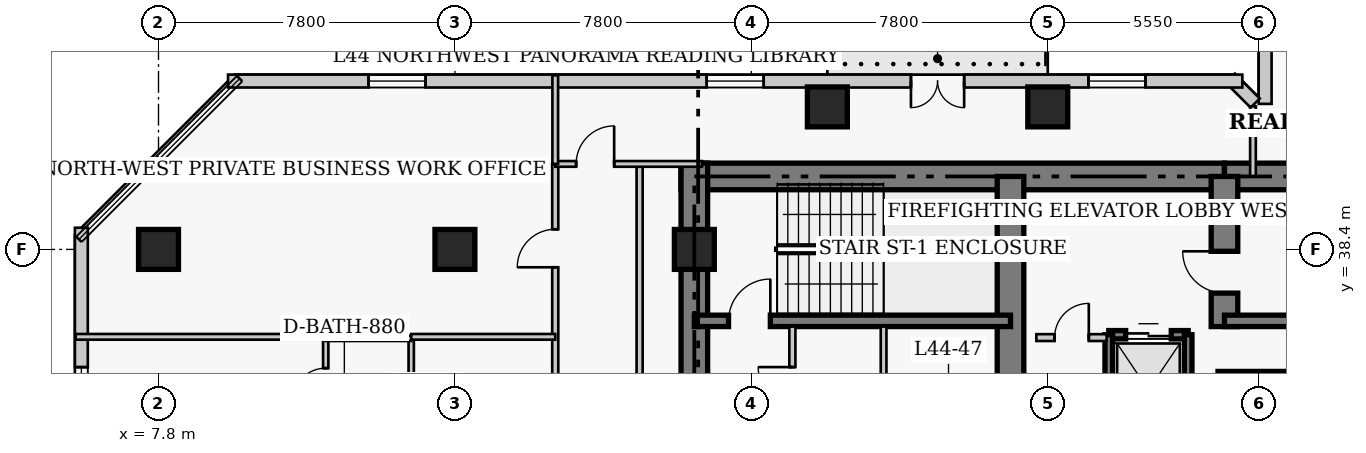
"""IFC4 building model, lengths in metres.
Left out: names, types, materials, properties, quantities, classifications, styles, units other than length and angle.
Written with IfcOpenShell. Run it as: python <this file> out.ifc"""

import sys

from ifc_helpers import new_model, si_unit, direction, frame, frame_2d, origin, origin_2d, place, context, subcontext, project, spatial, rectangle, extrude, element, fill, save


model = new_model("IFC4")
c1 = context("Model", 3, precision=1e-05, world=origin(), true_north=direction((0.0, 1.0)))
c2 = subcontext(c1, "Body", "Model", "MODEL_VIEW")
j1 = project(units=[si_unit("LENGTHUNIT", "METRE"), si_unit("PLANEANGLEUNIT", "RADIAN")], contexts=[c1])
p1 = place(None, origin())
s1 = spatial("IfcSite", under=j1, at=p1, CompositionType="ELEMENT")
p2 = place(p1, origin())
s2 = spatial("IfcBuilding", under=s1, at=p2, CompositionType="ELEMENT")
p3 = place(p2, frame((0.0, 0.0, 176.4)))
s3 = spatial("IfcBuildingStorey", under=s2, at=p3, CompositionType="ELEMENT", Elevation=176.4)
p4 = place(p3, frame((21.55, 40.32, 0.0), z_axis=(0.0, 0.0, 1.0), x_axis=(1.0, 0.0, 0.0)))
e1 = element("IfcWall", 1, at=p4, inside=s3, PredefinedType="SHEAR", context=c2, shape_type="SweptSolid", body=[
    extrude(rectangle(XDim=14.3, YDim=0.7, at=frame_2d((7.15, 0.0))), origin(), (0.0, 0.0, 1.0), 3.8),
])
p5 = place(p3, frame((35.85, 40.32, 0.0), z_axis=(0.0, 0.0, 1.0), x_axis=(1.0, 0.0, 0.0)))
e2 = element("IfcWall", 2, at=p5, inside=s3, PredefinedType="SHEAR", context=c2, shape_type="SweptSolid", body=[
    extrude(rectangle(XDim=12.6, YDim=0.7, at=frame_2d((6.3, 0.0))), origin(), (0.0, 0.0, 1.0), 3.8),
])
p6 = place(p3, frame((21.9, 27.05, 0.0), z_axis=(0.0, 0.0, 1.0), x_axis=(0.0, 1.0, 0.0)))
e3 = element("IfcWall", 3, at=p6, inside=s3, PredefinedType="SHEAR", context=c2, shape_type="SweptSolid", body=[
    extrude(rectangle(XDim=13.62, YDim=0.7, at=frame_2d((6.81, 0.0))), origin(), (0.0, 0.0, 1.0), 3.8),
])
p7 = place(p3, frame((30.22, 33.1, 0.0), z_axis=(0.0, 0.0, 1.0), x_axis=(0.0, 1.0, 0.0)))
e4 = element("IfcWall", 4, at=p7, inside=s3, PredefinedType="SHEAR", context=c2, shape_type="SweptSolid", body=[
    extrude(rectangle(XDim=7.22, YDim=0.7, at=frame_2d((3.61, 0.0))), origin(), (0.0, 0.0, 1.0), 3.8),
])
p8 = place(p3, frame((35.85, 36.37, 0.0), z_axis=(0.0, 0.0, 1.0), x_axis=(0.0, 1.0, 0.0)))
e5 = element("IfcWall", 5, at=p8, inside=s3, PredefinedType="SHEAR", context=c2, shape_type="SweptSolid", body=[
    extrude(rectangle(XDim=3.95, YDim=0.7, at=frame_2d((1.975, 0.0))), origin(), (0.0, 0.0, 1.0), 3.8),
])
p9 = place(p8, frame((0.88, 0.0, 0.0)))
e6 = element("IfcOpeningElement", 6, at=p9, cuts=e5, PredefinedType="OPENING", context=c2, shape_type="SweptSolid", body=[
    extrude(rectangle(XDim=1.1, YDim=2.15, at=frame_2d((0.55, 1.075))), frame((0.0, 0.36, 0.0), z_axis=(0.0, -1.0, 0.0), x_axis=(1.0, 0.0, 0.0)), (0.0, 0.0, 1.0), 0.72),
])
p10 = place(p3, frame((21.9, 36.52, 0.0), z_axis=(0.0, 0.0, 1.0), x_axis=(1.0, 0.0, 0.0)))
e7 = element("IfcWall", 7, at=p10, inside=s3, PredefinedType="SHEAR", context=c2, shape_type="SweptSolid", body=[
    extrude(rectangle(XDim=8.32, YDim=0.3, at=frame_2d((4.16, 0.0))), origin(), (0.0, 0.0, 1.0), 3.8),
])
p11 = place(p10, frame((0.9, 0.0, 0.0)))
e8 = element("IfcOpeningElement", 8, at=p11, cuts=e7, PredefinedType="OPENING", context=c2, shape_type="SweptSolid", body=[
    extrude(rectangle(XDim=1.1, YDim=2.15, at=frame_2d((0.55, 1.075))), frame((0.0, 0.16, 0.0), z_axis=(0.0, -1.0, 0.0), x_axis=(1.0, 0.0, 0.0)), (0.0, 0.0, 1.0), 0.32),
])
p12 = place(p3, frame((35.85, 36.52, 0.0), z_axis=(0.0, 0.0, 1.0), x_axis=(1.0, 0.0, 0.0)))
e9 = element("IfcWall", 9, at=p12, inside=s3, PredefinedType="SHEAR", context=c2, shape_type="SweptSolid", body=[
    extrude(rectangle(XDim=8.33, YDim=0.3, at=frame_2d((4.165, 0.0))), origin(), (0.0, 0.0, 1.0), 3.8),
])
for number, where, z_axis, x_axis in (
    (10, (7.8, 38.4, 0.0), (0.0, 0.0, 1.0), (1.0, 0.0, 0.0)),
    (11, (15.6, 38.4, 0.0), (0.0, 0.0, 1.0), (1.0, 0.0, 0.0)),
    (12, (21.9, 38.4, 0.0), (0.0, 0.0, 1.0), (1.0, 0.0, 0.0)),
    (13, (25.4, 42.15, 0.0), (0.0, 0.0, 1.0), (1.0, 0.0, 0.0)),
    (14, (31.2, 42.15, 0.0), (0.0, 0.0, 1.0), (1.0, 0.0, 0.0)),
):
    element("IfcColumn", number, at=place(p3, frame(where, z_axis=z_axis, x_axis=x_axis)), inside=s3, PredefinedType="COLUMN", context=c2, shape_type="SweptSolid", body=[
        extrude(rectangle(XDim=1.05, YDim=1.05, at=origin_2d()), origin(), (0.0, 0.0, 1.0), 3.8),
    ])
p13 = place(p3, frame((36.92, 44.37, 0.0), z_axis=(0.0, 0.0, 1.0), x_axis=(0.0, -1.0, 0.0)))
e15 = element("IfcWall", 15, at=p13, inside=s3, PredefinedType="SOLIDWALL", context=c2, shape_type="SweptSolid", body=[
    extrude(rectangle(XDim=2.14, YDim=0.34, at=frame_2d((1.07, 0.0))), origin(), (0.0, 0.0, 1.0), 3.55),
])
p14 = place(p3, frame((36.658, 42.251, 0.0), z_axis=(0.0, 0.0, 1.0), x_axis=(-0.707106781187, 0.707106781187, 0.0)))
e16 = element("IfcWall", 16, at=p14, inside=s3, PredefinedType="SOLIDWALL", context=c2, shape_type="SweptSolid", body=[
    extrude(rectangle(XDim=0.929, YDim=0.34, at=frame_2d((0.464, 0.0))), origin(), (0.0, 0.0, 1.0), 3.55),
])
p15 = place(p3, frame((36.32, 42.83, 0.0), z_axis=(0.0, 0.0, 1.0), x_axis=(-1.0, 0.0, 0.0)))
e17 = element("IfcWall", 17, at=p15, inside=s3, PredefinedType="SOLIDWALL", context=c2, shape_type="SweptSolid", body=[
    extrude(rectangle(XDim=26.69, YDim=0.34, at=frame_2d((13.345, 0.0))), origin(), (0.0, 0.0, 1.0), 3.55),
])
p16 = place(p15, frame((7.32, 0.0, 0.0)))
e18 = element("IfcOpeningElement", 18, at=p16, cuts=e17, PredefinedType="OPENING", context=c2, shape_type="SweptSolid", body=[
    extrude(rectangle(XDim=1.4, YDim=2.15, at=frame_2d((0.7, 1.075))), frame((0.0, 0.18, 0.0), z_axis=(0.0, -1.0, 0.0), x_axis=(1.0, 0.0, 0.0)), (0.0, 0.0, 1.0), 0.36),
])
p17 = place(p15, frame((2.548, 0.0, 0.85)))
e19 = element("IfcOpeningElement", 19, at=p17, cuts=e17, PredefinedType="OPENING", context=c2, shape_type="SweptSolid", body=[
    extrude(rectangle(XDim=1.5, YDim=1.75, at=frame_2d((0.75, 0.875))), frame((0.0, 0.18, 0.0), z_axis=(0.0, -1.0, 0.0), x_axis=(1.0, 0.0, 0.0)), (0.0, 0.0, 1.0), 0.36),
])
p18 = place(p15, frame((12.595, 0.0, 0.85)))
e20 = element("IfcOpeningElement", 20, at=p18, cuts=e17, PredefinedType="OPENING", context=c2, shape_type="SweptSolid", body=[
    extrude(rectangle(XDim=1.5, YDim=1.75, at=frame_2d((0.75, 0.875))), frame((0.0, 0.18, 0.0), z_axis=(0.0, -1.0, 0.0), x_axis=(1.0, 0.0, 0.0)), (0.0, 0.0, 1.0), 0.36),
])
p19 = place(p15, frame((21.492, 0.0, 0.85)))
e21 = element("IfcOpeningElement", 21, at=p19, cuts=e17, PredefinedType="OPENING", context=c2, shape_type="SweptSolid", body=[
    extrude(rectangle(XDim=1.5, YDim=1.75, at=frame_2d((0.75, 0.875))), frame((0.0, 0.18, 0.0), z_axis=(0.0, -1.0, 0.0), x_axis=(1.0, 0.0, 0.0)), (0.0, 0.0, 1.0), 0.36),
])
p20 = place(p3, frame((5.77, 38.97, 0.0), z_axis=(0.0, 0.0, 1.0), x_axis=(0.0, -1.0, 0.0)))
e22 = element("IfcWall", 22, at=p20, inside=s3, PredefinedType="SOLIDWALL", context=c2, shape_type="SweptSolid", body=[
    extrude(rectangle(XDim=30.14, YDim=0.34, at=frame_2d((15.07, 0.0))), origin(), (0.0, 0.0, 1.0), 3.55),
])
p21 = place(p20, frame((3.667, 0.0, 0.85)))
e23 = element("IfcOpeningElement", 23, at=p21, cuts=e22, PredefinedType="OPENING", context=c2, shape_type="SweptSolid", body=[
    extrude(rectangle(XDim=1.5, YDim=1.75, at=frame_2d((0.75, 0.875))), frame((0.0, 0.18, 0.0), z_axis=(0.0, -1.0, 0.0), x_axis=(1.0, 0.0, 0.0)), (0.0, 0.0, 1.0), 0.36),
])
p22 = place(p20, frame((10.552, 0.0, 0.85)))
e24 = element("IfcOpeningElement", 24, at=p22, cuts=e22, PredefinedType="OPENING", context=c2, shape_type="SweptSolid", body=[
    extrude(rectangle(XDim=1.5, YDim=1.75, at=frame_2d((0.75, 0.875))), frame((0.0, 0.18, 0.0), z_axis=(0.0, -1.0, 0.0), x_axis=(1.0, 0.0, 0.0)), (0.0, 0.0, 1.0), 0.36),
])
p23 = place(p20, frame((16.938, 0.0, 0.85)))
e25 = element("IfcOpeningElement", 25, at=p23, cuts=e22, PredefinedType="OPENING", context=c2, shape_type="SweptSolid", body=[
    extrude(rectangle(XDim=1.5, YDim=1.75, at=frame_2d((0.75, 0.875))), frame((0.0, 0.18, 0.0), z_axis=(0.0, -1.0, 0.0), x_axis=(1.0, 0.0, 0.0)), (0.0, 0.0, 1.0), 0.36),
])
p24 = place(p20, frame((25.623, 0.0, 0.85)))
e26 = element("IfcOpeningElement", 26, at=p24, cuts=e22, PredefinedType="OPENING", context=c2, shape_type="SweptSolid", body=[
    extrude(rectangle(XDim=1.5, YDim=1.75, at=frame_2d((0.75, 0.875))), frame((0.0, 0.18, 0.0), z_axis=(0.0, -1.0, 0.0), x_axis=(1.0, 0.0, 0.0)), (0.0, 0.0, 1.0), 0.36),
])
p25 = place(p3, frame((35.68, 35.08, 0.0), z_axis=(0.0, 0.0, 1.0), x_axis=(1.0, 0.0, 0.0)))
e27 = element("IfcWall", 27, at=p25, inside=s3, PredefinedType="SHEAR", context=c2, shape_type="SweptSolid", body=[
    extrude(rectangle(XDim=2.32, YDim=0.22, at=frame_2d((1.16, 0.0))), origin(), (0.0, 0.0, 1.0), 3.8),
])
p26 = place(p3, frame((32.805, 36.155, 0.0), z_axis=(0.0, 0.0, 1.0), x_axis=(1.0, 0.0, 0.0)))
e28 = element("IfcWall", 28, at=p26, inside=s3, PredefinedType="SHEAR", context=c2, shape_type="SweptSolid", body=[
    extrude(rectangle(XDim=2.09, YDim=0.22, at=frame_2d((1.045, 0.0))), origin(), (0.0, 0.0, 1.0), 3.8),
])
p27 = place(p26, frame((0.445, 0.0, 0.0)))
e29 = element("IfcOpeningElement", 29, at=p27, cuts=e28, PredefinedType="OPENING", context=c2, shape_type="SweptSolid", body=[
    extrude(rectangle(XDim=1.2, YDim=2.15, at=frame_2d((0.6, 1.075))), frame((0.0, 0.12, 0.0), z_axis=(0.0, -1.0, 0.0), x_axis=(1.0, 0.0, 0.0)), (0.0, 0.0, 1.0), 0.24),
])
for number, where, z_axis, x_axis in (
    (30, (32.805, 33.245, 0.0), (0.0, 0.0, 1.0), (0.0, 1.0, 0.0)),
    (31, (34.895, 33.245, 0.0), (0.0, 0.0, 1.0), (0.0, 1.0, 0.0)),
):
    element("IfcWall", number, at=place(p3, frame(where, z_axis=z_axis, x_axis=x_axis)), inside=s3, PredefinedType="SHEAR", context=c2, shape_type="SweptSolid", body=[
        extrude(rectangle(XDim=2.91, YDim=0.2, at=frame_2d((1.455, 0.0))), origin(), (0.0, 0.0, 1.0), 3.8),
    ])
p28 = place(p3, frame((30.9, 36.08, 0.0), z_axis=(0.0, 0.0, 1.0), x_axis=(1.0, 0.0, 0.0)))
e32 = element("IfcWall", 32, at=p28, inside=s3, PredefinedType="PARTITIONING", context=c2, shape_type="SweptSolid", body=[
    extrude(rectangle(XDim=1.85, YDim=0.18, at=frame_2d((0.925, 0.0))), origin(), (0.0, 0.0, 1.0), 3.55),
])
p29 = place(p28, frame((0.48, 0.0, 0.0)))
e33 = element("IfcOpeningElement", 33, at=p29, cuts=e32, PredefinedType="OPENING", context=c2, shape_type="SweptSolid", body=[
    extrude(rectangle(XDim=0.9, YDim=2.15, at=frame_2d((0.45, 1.075))), frame((0.0, 0.1, 0.0), z_axis=(0.0, -1.0, 0.0), x_axis=(1.0, 0.0, 0.0)), (0.0, 0.0, 1.0), 0.2),
])
p30 = place(p3, frame((24.48, 32.8, 0.0), z_axis=(0.0, 0.0, 1.0), x_axis=(0.0, 1.0, 0.0)))
e34 = element("IfcWall", 34, at=p30, inside=s3, PredefinedType="PARTITIONING", context=c2, shape_type="SweptSolid", body=[
    extrude(rectangle(XDim=3.57, YDim=0.16, at=frame_2d((1.785, 0.0))), origin(), (0.0, 0.0, 1.0), 3.55),
])
p31 = place(p30, frame((1.604, 0.0, 0.0)))
e35 = element("IfcOpeningElement", 35, at=p31, cuts=e34, PredefinedType="OPENING", context=c2, shape_type="SweptSolid", body=[
    extrude(rectangle(XDim=0.9, YDim=2.1, at=frame_2d((0.45, 1.05))), frame((0.0, 0.09, 0.0), z_axis=(0.0, -1.0, 0.0), x_axis=(1.0, 0.0, 0.0)), (0.0, 0.0, 1.0), 0.18),
])
p32 = place(p3, frame((26.88, 32.75, 0.0), z_axis=(0.0, 0.0, 1.0), x_axis=(0.0, 1.0, 0.0)))
e36 = element("IfcWall", 36, at=p32, inside=s3, PredefinedType="PARTITIONING", context=c2, shape_type="SweptSolid", body=[
    extrude(rectangle(XDim=3.62, YDim=0.15, at=frame_2d((1.81, 0.0))), origin(), (0.0, 0.0, 1.0), 3.55),
])
p33 = place(p3, frame((18.24, 6.85, 0.0), z_axis=(0.0, 0.0, 1.0), x_axis=(0.0, 1.0, 0.0)))
e37 = element("IfcWall", 37, at=p33, inside=s3, PredefinedType="PARTITIONING", context=c2, shape_type="SweptSolid", body=[
    extrude(rectangle(XDim=33.8, YDim=0.16, at=frame_2d((16.9, 0.0))), origin(), (0.0, 0.0, 1.0), 3.55),
])
p34 = place(p33, frame((1.7, 0.0, 0.0)))
e38 = element("IfcOpeningElement", 38, at=p34, cuts=e37, PredefinedType="OPENING", context=c2, shape_type="SweptSolid", body=[
    extrude(rectangle(XDim=0.95, YDim=2.1, at=frame_2d((0.475, 1.05))), frame((0.0, 0.09, 0.0), z_axis=(0.0, -1.0, 0.0), x_axis=(1.0, 0.0, 0.0)), (0.0, 0.0, 1.0), 0.18),
])
p35 = place(p33, frame((8.275, 0.0, 0.0)))
e39 = element("IfcOpeningElement", 39, at=p35, cuts=e37, PredefinedType="OPENING", context=c2, shape_type="SweptSolid", body=[
    extrude(rectangle(XDim=0.95, YDim=2.1, at=frame_2d((0.475, 1.05))), frame((0.0, 0.09, 0.0), z_axis=(0.0, -1.0, 0.0), x_axis=(1.0, 0.0, 0.0)), (0.0, 0.0, 1.0), 0.18),
])
p36 = place(p33, frame((20.725, 0.0, 0.0)))
e40 = element("IfcOpeningElement", 40, at=p36, cuts=e37, PredefinedType="OPENING", context=c2, shape_type="SweptSolid", body=[
    extrude(rectangle(XDim=0.95, YDim=2.1, at=frame_2d((0.475, 1.05))), frame((0.0, 0.09, 0.0), z_axis=(0.0, -1.0, 0.0), x_axis=(1.0, 0.0, 0.0)), (0.0, 0.0, 1.0), 0.18),
])
p37 = place(p33, frame((31.08, 0.0, 0.0)))
e41 = element("IfcOpeningElement", 41, at=p37, cuts=e37, PredefinedType="OPENING", context=c2, shape_type="SweptSolid", body=[
    extrude(rectangle(XDim=1.0, YDim=2.15, at=frame_2d((0.5, 1.075))), frame((0.0, 0.09, 0.0), z_axis=(0.0, -1.0, 0.0), x_axis=(1.0, 0.0, 0.0)), (0.0, 0.0, 1.0), 0.18),
])
p38 = place(p3, frame((20.46, 35.02, 0.0), z_axis=(0.0, 0.0, 1.0), x_axis=(0.0, 1.0, 0.0)))
e42 = element("IfcWall", 42, at=p38, inside=s3, PredefinedType="PARTITIONING", context=c2, shape_type="SweptSolid", body=[
    extrude(rectangle(XDim=5.63, YDim=0.16, at=frame_2d((2.815, 0.0))), origin(), (0.0, 0.0, 1.0), 3.55),
])
p39 = place(p3, frame((18.24, 40.65, 0.0), z_axis=(0.0, 0.0, 1.0), x_axis=(1.0, 0.0, 0.0)))
e43 = element("IfcWall", 43, at=p39, inside=s3, PredefinedType="PARTITIONING", context=c2, shape_type="SweptSolid", body=[
    extrude(rectangle(XDim=3.86, YDim=0.15, at=frame_2d((1.93, 0.0))), origin(), (0.0, 0.0, 1.0), 3.55),
])
p40 = place(p39, frame((0.55, 0.0, 0.0)))
e44 = element("IfcOpeningElement", 44, at=p40, cuts=e43, PredefinedType="OPENING", context=c2, shape_type="SweptSolid", body=[
    extrude(rectangle(XDim=1.0, YDim=2.15, at=frame_2d((0.5, 1.075))), frame((0.0, 0.085, 0.0), z_axis=(0.0, -1.0, 0.0), x_axis=(1.0, 0.0, 0.0)), (0.0, 0.0, 1.0), 0.17),
])
p41 = place(p3, frame((18.24, 40.65, 0.0), z_axis=(0.0, 0.0, 1.0), x_axis=(0.0, 1.0, 0.0)))
e45 = element("IfcWall", 45, at=p41, inside=s3, PredefinedType="PARTITIONING", context=c2, shape_type="SweptSolid", body=[
    extrude(rectangle(XDim=2.33, YDim=0.15, at=frame_2d((1.165, 0.0))), origin(), (0.0, 0.0, 1.0), 3.55),
])
p42 = place(p3, frame((36.6, 40.32, 0.0), z_axis=(0.0, 0.0, 1.0), x_axis=(0.0, 1.0, 0.0)))
e46 = element("IfcWall", 46, at=p42, inside=s3, PredefinedType="PARTITIONING", context=c2, shape_type="SweptSolid", body=[
    extrude(rectangle(XDim=1.845, YDim=0.15, at=frame_2d((0.922, 0.0))), origin(), (0.0, 0.0, 1.0), 3.55),
])
p43 = place(p3, frame((12.2, 33.61, 0.0), z_axis=(0.0, 0.0, 1.0), x_axis=(0.0, 1.0, 0.0)))
e47 = element("IfcWall", 47, at=p43, inside=s3, PredefinedType="PLUMBINGWALL", context=c2, shape_type="SweptSolid", body=[
    extrude(rectangle(XDim=2.45, YDim=0.14, at=frame_2d((1.225, 0.0))), origin(), (0.0, 0.0, 1.0), 3.55),
])
p44 = place(p43, frame((0.785, 0.0, 0.0)))
e48 = element("IfcOpeningElement", 48, at=p44, cuts=e47, PredefinedType="OPENING", context=c2, shape_type="SweptSolid", body=[
    extrude(rectangle(XDim=0.88, YDim=2.05, at=frame_2d((0.44, 1.025))), frame((0.0, 0.08, 0.0), z_axis=(0.0, -1.0, 0.0), x_axis=(1.0, 0.0, 0.0)), (0.0, 0.0, 1.0), 0.16),
])
p45 = place(p3, frame((14.45, 33.61, 0.0), z_axis=(0.0, 0.0, 1.0), x_axis=(0.0, 1.0, 0.0)))
e49 = element("IfcWall", 49, at=p45, inside=s3, PredefinedType="PLUMBINGWALL", context=c2, shape_type="SweptSolid", body=[
    extrude(rectangle(XDim=2.45, YDim=0.14, at=frame_2d((1.225, 0.0))), origin(), (0.0, 0.0, 1.0), 3.55),
])
p46 = place(p3, frame((12.2, 36.06, 0.0), z_axis=(0.0, 0.0, 1.0), x_axis=(1.0, 0.0, 0.0)))
e50 = element("IfcWall", 50, at=p46, inside=s3, PredefinedType="PLUMBINGWALL", context=c2, shape_type="SweptSolid", body=[
    extrude(rectangle(XDim=2.25, YDim=0.14, at=frame_2d((1.125, 0.0))), origin(), (0.0, 0.0, 1.0), 3.55),
])
p47 = place(p3, frame((5.62, 36.1, 0.0), z_axis=(0.0, 0.0, 1.0), x_axis=(1.0, 0.0, 0.0)))
e51 = element("IfcWall", 51, at=p47, inside=s3, PredefinedType="PARTITIONING", context=c2, shape_type="SweptSolid", body=[
    extrude(rectangle(XDim=6.58, YDim=0.15, at=frame_2d((3.29, 0.0))), origin(), (0.0, 0.0, 1.0), 3.55),
])
p48 = place(p3, frame((14.45, 36.1, 0.0), z_axis=(0.0, 0.0, 1.0), x_axis=(1.0, 0.0, 0.0)))
e52 = element("IfcWall", 52, at=p48, inside=s3, PredefinedType="PARTITIONING", context=c2, shape_type="SweptSolid", body=[
    extrude(rectangle(XDim=3.79, YDim=0.15, at=frame_2d((1.895, 0.0))), origin(), (0.0, 0.0, 1.0), 3.55),
])
p49 = place(p16, origin())
e53 = element("IfcDoor", 53, at=p49, inside=s3, OperationType="DOUBLE_DOOR_SINGLE_SWING", PredefinedType="DOOR", context=c2, shape_type="SweptSolid", body=[
    extrude(rectangle(XDim=1.4, YDim=2.15, at=frame_2d((0.7, 1.075))), frame((0.0, 0.025, 0.0), z_axis=(0.0, -1.0, 0.0), x_axis=(1.0, 0.0, 0.0)), (0.0, 0.0, 1.0), 0.05),
])
fill(e18, e53)
p50 = place(p17, origin())
e54 = element("IfcWindow", 54, at=p50, inside=s3, PartitioningType="SINGLE_PANEL", PredefinedType="WINDOW", context=c2, shape_type="SweptSolid", body=[
    extrude(rectangle(XDim=1.5, YDim=1.75, at=frame_2d((0.75, 0.875))), frame((0.0, 0.03, 0.0), z_axis=(0.0, -1.0, 0.0), x_axis=(1.0, 0.0, 0.0)), (0.0, 0.0, 1.0), 0.06),
])
fill(e19, e54)
p51 = place(p18, origin())
e55 = element("IfcWindow", 55, at=p51, inside=s3, PartitioningType="SINGLE_PANEL", PredefinedType="WINDOW", context=c2, shape_type="SweptSolid", body=[
    extrude(rectangle(XDim=1.5, YDim=1.75, at=frame_2d((0.75, 0.875))), frame((0.0, 0.03, 0.0), z_axis=(0.0, -1.0, 0.0), x_axis=(1.0, 0.0, 0.0)), (0.0, 0.0, 1.0), 0.06),
])
fill(e20, e55)
p52 = place(p19, origin())
e56 = element("IfcWindow", 56, at=p52, inside=s3, PartitioningType="SINGLE_PANEL", PredefinedType="WINDOW", context=c2, shape_type="SweptSolid", body=[
    extrude(rectangle(XDim=1.5, YDim=1.75, at=frame_2d((0.75, 0.875))), frame((0.0, 0.03, 0.0), z_axis=(0.0, -1.0, 0.0), x_axis=(1.0, 0.0, 0.0)), (0.0, 0.0, 1.0), 0.06),
])
fill(e21, e56)
p53 = place(p21, origin())
e57 = element("IfcWindow", 57, at=p53, inside=s3, PartitioningType="SINGLE_PANEL", PredefinedType="WINDOW", context=c2, shape_type="SweptSolid", body=[
    extrude(rectangle(XDim=1.5, YDim=1.75, at=frame_2d((0.75, 0.875))), frame((0.0, 0.03, 0.0), z_axis=(0.0, -1.0, 0.0), x_axis=(1.0, 0.0, 0.0)), (0.0, 0.0, 1.0), 0.06),
])
fill(e23, e57)
p54 = place(p27, origin())
e58 = element("IfcDoor", 58, at=p54, inside=s3, OperationType="DOUBLE_DOOR_SLIDING", PredefinedType="DOOR", context=c2, shape_type="SweptSolid", body=[
    extrude(rectangle(XDim=1.2, YDim=2.15, at=frame_2d((0.6, 1.075))), frame((0.0, 0.025, 0.0), z_axis=(0.0, -1.0, 0.0), x_axis=(1.0, 0.0, 0.0)), (0.0, 0.0, 1.0), 0.05),
])
fill(e29, e58)
p55 = place(p29, origin())
e59 = element("IfcDoor", 59, at=p55, inside=s3, OperationType="SINGLE_SWING_RIGHT", PredefinedType="DOOR", context=c2, shape_type="SweptSolid", body=[
    extrude(rectangle(XDim=0.9, YDim=2.15, at=frame_2d((0.45, 1.075))), frame((0.0, 0.025, 0.0), z_axis=(0.0, -1.0, 0.0), x_axis=(1.0, 0.0, 0.0)), (0.0, 0.0, 1.0), 0.05),
])
fill(e33, e59)
p56 = place(p31, origin())
e60 = element("IfcDoor", 60, at=p56, inside=s3, OperationType="SINGLE_SWING_RIGHT", PredefinedType="DOOR", context=c2, shape_type="SweptSolid", body=[
    extrude(rectangle(XDim=0.9, YDim=2.1, at=frame_2d((0.45, 1.05))), frame((0.0, 0.025, 0.0), z_axis=(0.0, -1.0, 0.0), x_axis=(1.0, 0.0, 0.0)), (0.0, 0.0, 1.0), 0.05),
])
fill(e35, e60)
p57 = place(p40, origin())
e61 = element("IfcDoor", 61, at=p57, inside=s3, OperationType="SINGLE_SWING_RIGHT", PredefinedType="DOOR", context=c2, shape_type="SweptSolid", body=[
    extrude(rectangle(XDim=1.0, YDim=2.15, at=frame_2d((0.5, 1.075))), frame((0.0, 0.025, 0.0), z_axis=(0.0, -1.0, 0.0), x_axis=(1.0, 0.0, 0.0)), (0.0, 0.0, 1.0), 0.05),
])
fill(e44, e61)
p58 = place(p44, origin())
e62 = element("IfcDoor", 62, at=p58, inside=s3, OperationType="SINGLE_SWING_LEFT", PredefinedType="DOOR", context=c2, shape_type="SweptSolid", body=[
    extrude(rectangle(XDim=0.88, YDim=2.05, at=frame_2d((0.44, 1.025))), frame((0.0, 0.025, 0.0), z_axis=(0.0, -1.0, 0.0), x_axis=(1.0, 0.0, 0.0)), (0.0, 0.0, 1.0), 0.05),
])
fill(e48, e62)
p59 = place(p37, origin())
e63 = element("IfcDoor", 63, at=p59, inside=s3, OperationType="SINGLE_SWING_LEFT", PredefinedType="DOOR", context=c2, shape_type="SweptSolid", body=[
    extrude(rectangle(XDim=1.0, YDim=2.15, at=frame_2d((0.5, 1.075))), frame((0.0, 0.025, 0.0), z_axis=(0.0, -1.0, 0.0), x_axis=(1.0, 0.0, 0.0)), (0.0, 0.0, 1.0), 0.05),
])
fill(e41, e63)
p60 = place(p11, origin())
e64 = element("IfcDoor", 64, at=p60, inside=s3, OperationType="SINGLE_SWING_RIGHT", PredefinedType="DOOR", context=c2, shape_type="SweptSolid", body=[
    extrude(rectangle(XDim=1.1, YDim=2.15, at=frame_2d((0.55, 1.075))), frame((0.0, 0.025, 0.0), z_axis=(0.0, -1.0, 0.0), x_axis=(1.0, 0.0, 0.0)), (0.0, 0.0, 1.0), 0.05),
])
fill(e8, e64)
p61 = place(p9, origin())
e65 = element("IfcDoor", 65, at=p61, inside=s3, OperationType="SINGLE_SWING_RIGHT", PredefinedType="DOOR", context=c2, shape_type="SweptSolid", body=[
    extrude(rectangle(XDim=1.1, YDim=2.15, at=frame_2d((0.55, 1.075))), frame((0.0, 0.025, 0.0), z_axis=(0.0, -1.0, 0.0), x_axis=(1.0, 0.0, 0.0)), (0.0, 0.0, 1.0), 0.05),
])
fill(e6, e65)
save(model, sys.argv[1])
